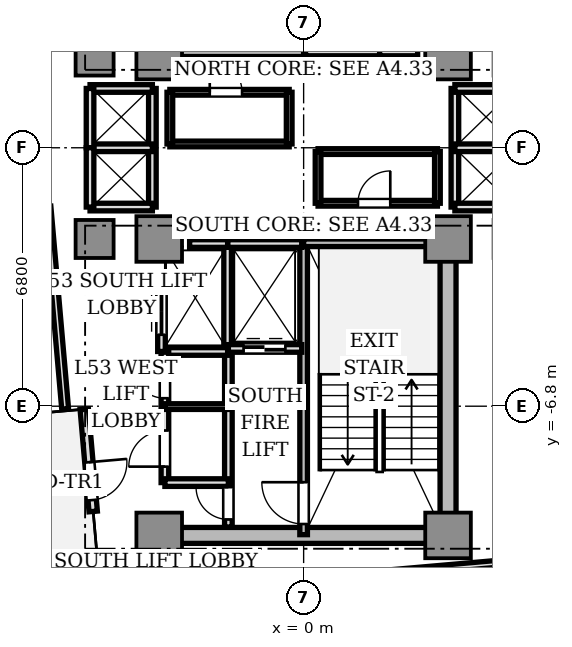
"""IFC4 building model, lengths in metres.
Left out: names, types, materials, properties, quantities, classifications, styles, units other than length and angle.
Written with IfcOpenShell. Run it as: python <this file> out.ifc"""

import sys

from ifc_helpers import new_model, si_unit, direction, frame, frame_2d, origin, origin_2d, place, context, subcontext, project, spatial, rectangle, extrude, source, transform, mapped, element, fill, save


model = new_model("IFC4")
c1 = context("Model", 3, precision=1e-05, world=origin(), true_north=direction((0.0, 1.0)))
c2 = subcontext(c1, "Body", "Model", "MODEL_VIEW")
j1 = project(units=[si_unit("LENGTHUNIT", "METRE"), si_unit("PLANEANGLEUNIT", "RADIAN")], contexts=[c1])
p1 = place(None, origin())
s1 = spatial("IfcSite", under=j1, at=p1, CompositionType="ELEMENT")
p2 = place(p1, origin())
s2 = spatial("IfcBuilding", under=s1, at=p2, CompositionType="ELEMENT")
p3 = place(p2, frame((0.0, 0.0, 191.95)))
s3 = spatial("IfcBuildingStorey", under=s2, at=p3, CompositionType="ELEMENT", Elevation=191.95)
p4 = place(p3, frame((-3.55, -10.2, 0.0), z_axis=(0.0, 0.0, 1.0), x_axis=(1.0, 0.0, 0.0)))
e1 = element("IfcWall", 1, at=p4, inside=s3, PredefinedType="SHEAR", context=c2, shape_type="SweptSolid", body=[
    extrude(rectangle(XDim=7.1, YDim=0.42, at=frame_2d((3.55, 0.0))), origin(), (0.0, 0.0, 1.0), 3.11),
])
p5 = place(p3, frame((3.8, -9.75, 0.0), z_axis=(0.0, 0.0, 1.0), x_axis=(0.0, 1.0, 0.0)))
e2 = element("IfcWall", 2, at=p5, inside=s3, PredefinedType="SHEAR", context=c2, shape_type="SweptSolid", body=[
    extrude(rectangle(XDim=6.9, YDim=0.42, at=frame_2d((3.45, 0.0))), origin(), (0.0, 0.0, 1.0), 3.11),
])
m1 = source(origin(), c2, "Body", "SweptSolid", [
    extrude(rectangle(XDim=1.2, YDim=1.2, at=origin_2d()), origin(), (0.0, 0.0, 1.0), 3.11),
])
for number, where, z_axis, x_axis in (
    (3, (-3.8, 2.4, 0.0), (0.0, 0.0, 1.0), (1.0, 0.0, 0.0)),
    (4, (3.8, 2.4, 0.0), (0.0, 0.0, 1.0), (1.0, 0.0, 0.0)),
    (5, (-3.8, -2.4, 0.0), (0.0, 0.0, 1.0), (1.0, 0.0, 0.0)),
    (6, (3.8, -2.4, 0.0), (0.0, 0.0, 1.0), (1.0, 0.0, 0.0)),
    (7, (-3.8, -10.2, 0.0), (0.0, 0.0, 1.0), (1.0, 0.0, 0.0)),
    (8, (3.8, -10.2, 0.0), (0.0, 0.0, 1.0), (1.0, 0.0, 0.0)),
):
    element("IfcColumn", number, at=place(p3, frame(where, z_axis=z_axis, x_axis=x_axis)), inside=s3, PredefinedType="COLUMN", context=c2, shape_type="MappedRepresentation", body=[
        mapped(m1, transform((0.0, 0.0, 0.0), scale=1.0)),
    ])
m2 = source(origin(), c2, "Body", "SweptSolid", [
    extrude(rectangle(XDim=1.0, YDim=1.0, at=origin_2d()), origin(), (0.0, 0.0, 1.0), 3.11),
])
for number, where, z_axis, x_axis in (
    (9, (-5.5, 2.4, 0.0), (0.0, 0.0, 1.0), (1.0, 0.0, 0.0)),
    (10, (-5.5, -2.4, 0.0), (0.0, 0.0, 1.0), (1.0, 0.0, 0.0)),
):
    element("IfcColumn", number, at=place(p3, frame(where, z_axis=z_axis, x_axis=x_axis)), inside=s3, PredefinedType="COLUMN", context=c2, shape_type="MappedRepresentation", body=[
        mapped(m2, transform((0.0, 0.0, 0.0), scale=1.0)),
    ])
p6 = place(p3, frame((-5.772, -6.879, 0.0), z_axis=(0.0, 0.0, 1.0), x_axis=(0.087168071984, -0.996193619346, 0.0)))
e11 = element("IfcWall", 11, at=p6, inside=s3, PredefinedType="STANDARD", context=c2, shape_type="SweptSolid", body=[
    extrude(rectangle(XDim=2.7, YDim=0.22, at=frame_2d((1.35, 0.0))), origin(), (0.0, 0.0, 1.0), 3.11),
])
p7 = place(p6, frame((1.4, 0.0, 0.0)))
e12 = element("IfcOpeningElement", 12, at=p7, cuts=e11, PredefinedType="OPENING", context=c2, shape_type="SweptSolid", body=[
    extrude(rectangle(XDim=1.0, YDim=2.2, at=frame_2d((0.5, 1.1))), frame((0.0, 0.12, 0.0), z_axis=(0.0, -1.0, 0.0), x_axis=(1.0, 0.0, 0.0)), (0.0, 0.0, 1.0), 0.24),
])
p8 = place(p3, frame((0.0, 2.5, 0.0), z_axis=(0.0, 0.0, 1.0), x_axis=(0.0, 1.0, 0.0)))
e13 = element("IfcWall", 13, at=p8, inside=s3, PredefinedType="SOLIDWALL", context=c2, shape_type="SweptSolid", body=[
    extrude(rectangle(XDim=7.68, YDim=0.2, at=frame_2d((3.84, 0.0))), origin(), (0.0, 0.0, 1.0), 3.11),
])
p9 = place(p8, frame((6.36, 0.0, 0.0)))
e14 = element("IfcOpeningElement", 14, at=p9, cuts=e13, PredefinedType="OPENING", context=c2, shape_type="SweptSolid", body=[
    extrude(rectangle(XDim=1.1, YDim=2.15, at=frame_2d((0.55, 1.075))), frame((0.0, 0.11, 0.0), z_axis=(0.0, -1.0, 0.0), x_axis=(1.0, 0.0, 0.0)), (0.0, 0.0, 1.0), 0.22),
])
p10 = place(p3, frame((-3.72, 2.5, 0.0), z_axis=(0.0, 0.0, 1.0), x_axis=(1.0, 0.0, 0.0)))
e15 = element("IfcWall", 15, at=p10, inside=s3, PredefinedType="SOLIDWALL", context=c2, shape_type="SweptSolid", body=[
    extrude(rectangle(XDim=3.72, YDim=0.2, at=frame_2d((1.86, 0.0))), origin(), (0.0, 0.0, 1.0), 3.11),
])
p11 = place(p3, frame((0.0, -10.18, 0.0), z_axis=(0.0, 0.0, 1.0), x_axis=(0.0, 1.0, 0.0)))
e16 = element("IfcWall", 16, at=p11, inside=s3, PredefinedType="SOLIDWALL", context=c2, shape_type="SweptSolid", body=[
    extrude(rectangle(XDim=7.68, YDim=0.2, at=frame_2d((3.84, 0.0))), origin(), (0.0, 0.0, 1.0), 3.11),
])
p12 = place(p11, frame((0.28, 0.0, 0.0)))
e17 = element("IfcOpeningElement", 17, at=p12, cuts=e16, PredefinedType="OPENING", context=c2, shape_type="SweptSolid", body=[
    extrude(rectangle(XDim=1.1, YDim=2.15, at=frame_2d((0.55, 1.075))), frame((0.0, 0.11, 0.0), z_axis=(0.0, -1.0, 0.0), x_axis=(1.0, 0.0, 0.0)), (0.0, 0.0, 1.0), 0.22),
])
p13 = place(p3, frame((0.0, -2.5, 0.0), z_axis=(0.0, 0.0, 1.0), x_axis=(1.0, 0.0, 0.0)))
e18 = element("IfcWall", 18, at=p13, inside=s3, PredefinedType="SOLIDWALL", context=c2, shape_type="SweptSolid", body=[
    extrude(rectangle(XDim=3.72, YDim=0.2, at=frame_2d((1.86, 0.0))), origin(), (0.0, 0.0, 1.0), 3.11),
])
p14 = place(p3, frame((-1.98, -9.98, 0.0), z_axis=(0.0, 0.0, 1.0), x_axis=(0.0, 1.0, 0.0)))
e19 = element("IfcWall", 19, at=p14, inside=s3, PredefinedType="SOLIDWALL", context=c2, shape_type="SweptSolid", body=[
    extrude(rectangle(XDim=4.66, YDim=0.2, at=frame_2d((2.33, 0.0))), origin(), (0.0, 0.0, 1.0), 2.66),
])
p15 = place(p14, frame((0.2, 0.0, 0.0)))
e20 = element("IfcOpeningElement", 20, at=p15, cuts=e19, PredefinedType="OPENING", context=c2, shape_type="SweptSolid", body=[
    extrude(rectangle(XDim=0.85, YDim=2.1, at=frame_2d((0.425, 1.05))), frame((0.0, 0.11, 0.0), z_axis=(0.0, -1.0, 0.0), x_axis=(1.0, 0.0, 0.0)), (0.0, 0.0, 1.0), 0.22),
])
p16 = place(p3, frame((2.0, 2.5, 0.0), z_axis=(0.0, 0.0, 1.0), x_axis=(0.0, 1.0, 0.0)))
e21 = element("IfcWall", 21, at=p16, inside=s3, PredefinedType="SOLIDWALL", context=c2, shape_type="SweptSolid", body=[
    extrude(rectangle(XDim=2.78, YDim=0.2, at=frame_2d((1.39, 0.0))), origin(), (0.0, 0.0, 1.0), 2.66),
])
p17 = place(p3, frame((0.05, 2.52, 0.0), z_axis=(0.0, 0.0, 1.0), x_axis=(1.0, 0.0, 0.0)))
e22 = element("IfcWall", 22, at=p17, inside=s3, PredefinedType="SOLIDWALL", context=c2, shape_type="SweptSolid", body=[
    extrude(rectangle(XDim=1.95, YDim=0.2, at=frame_2d((0.975, 0.0))), origin(), (0.0, 0.0, 1.0), 2.66),
])
p18 = place(p3, frame((-2.0, -5.28, 0.0), z_axis=(0.0, 0.0, 1.0), x_axis=(0.0, 1.0, 0.0)))
e23 = element("IfcWall", 23, at=p18, inside=s3, PredefinedType="SOLIDWALL", context=c2, shape_type="SweptSolid", body=[
    extrude(rectangle(XDim=2.78, YDim=0.2, at=frame_2d((1.39, 0.0))), origin(), (0.0, 0.0, 1.0), 2.66),
])
p19 = place(p3, frame((-2.0, -2.52, 0.0), z_axis=(0.0, 0.0, 1.0), x_axis=(1.0, 0.0, 0.0)))
e24 = element("IfcWall", 24, at=p19, inside=s3, PredefinedType="SOLIDWALL", context=c2, shape_type="SweptSolid", body=[
    extrude(rectangle(XDim=1.95, YDim=0.2, at=frame_2d((0.975, 0.0))), origin(), (0.0, 0.0, 1.0), 2.66),
])
p20 = place(p3, frame((-1.98, -5.28, 0.0), z_axis=(0.0, 0.0, 1.0), x_axis=(1.0, 0.0, 0.0)))
e25 = element("IfcWall", 25, at=p20, inside=s3, PredefinedType="SOLIDWALL", context=c2, shape_type="SweptSolid", body=[
    extrude(rectangle(XDim=1.93, YDim=0.2, at=frame_2d((0.965, 0.0))), origin(), (0.0, 0.0, 1.0), 2.66),
])
p21 = place(p20, frame((0.4, 0.0, 0.0)))
e26 = element("IfcOpeningElement", 26, at=p21, cuts=e25, PredefinedType="OPENING", context=c2, shape_type="SweptSolid", body=[
    extrude(rectangle(XDim=1.1, YDim=2.2, at=frame_2d((0.55, 1.1))), frame((0.0, 0.11, 0.0), z_axis=(0.0, -1.0, 0.0), x_axis=(1.0, 0.0, 0.0)), (0.0, 0.0, 1.0), 0.22),
])
for number, where, z_axis, x_axis in (
    (27, (2.0, 2.52, 0.0), (0.0, 0.0, 1.0), (1.0, 0.0, 0.0)),
    (28, (-3.0, -2.52, 0.0), (0.0, 0.0, 1.0), (1.0, 0.0, 0.0)),
):
    element("IfcWall", number, at=place(p3, frame(where, z_axis=z_axis, x_axis=x_axis)), inside=s3, PredefinedType="SOLIDWALL", context=c2, shape_type="SweptSolid", body=[
        extrude(rectangle(XDim=1.0, YDim=0.2, at=frame_2d((0.5, 0.0))), origin(), (0.0, 0.0, 1.0), 2.66),
    ])
p22 = place(p3, frame((-3.74, -5.36, 0.0), z_axis=(0.0, 0.0, 1.0), x_axis=(1.0, 0.0, 0.0)))
e29 = element("IfcWall", 29, at=p22, inside=s3, PredefinedType="SOLIDWALL", context=c2, shape_type="SweptSolid", body=[
    extrude(rectangle(XDim=1.74, YDim=0.2, at=frame_2d((0.87, 0.0))), origin(), (0.0, 0.0, 1.0), 2.66),
])
p23 = place(p3, frame((-3.74, -5.36, 0.0), z_axis=(0.0, 0.0, 1.0), x_axis=(0.0, 1.0, 0.0)))
e30 = element("IfcWall", 30, at=p23, inside=s3, PredefinedType="SOLIDWALL", context=c2, shape_type="SweptSolid", body=[
    extrude(rectangle(XDim=2.08, YDim=0.2, at=frame_2d((1.04, 0.0))), origin(), (0.0, 0.0, 1.0), 2.66),
])
p24 = place(p23, frame((0.44, 0.0, 0.0)))
e31 = element("IfcOpeningElement", 31, at=p24, cuts=e30, PredefinedType="OPENING", context=c2, shape_type="SweptSolid", body=[
    extrude(rectangle(XDim=1.2, YDim=2.2, at=frame_2d((0.6, 1.1))), frame((0.0, 0.11, 0.0), z_axis=(0.0, -1.0, 0.0), x_axis=(1.0, 0.0, 0.0)), (0.0, 0.0, 1.0), 0.22),
])
p25 = place(p3, frame((3.98, -1.56, 0.0), z_axis=(0.0, 0.0, 1.0), x_axis=(0.0, 1.0, 0.0)))
e32 = element("IfcWall", 32, at=p25, inside=s3, PredefinedType="SOLIDWALL", context=c2, shape_type="SweptSolid", body=[
    extrude(rectangle(XDim=3.12, YDim=0.2, at=frame_2d((1.56, 0.0))), origin(), (0.0, 0.0, 1.0), 2.28),
])
for number, where, z_axis, x_axis in (
    (33, (3.98, 1.56, 0.0), (0.0, 0.0, 1.0), (1.0, 0.0, 0.0)),
    (34, (3.98, -1.56, 0.0), (0.0, 0.0, 1.0), (1.0, 0.0, 0.0)),
    (35, (3.98, 0.0, 0.0), (0.0, 0.0, 1.0), (1.0, 0.0, 0.0)),
):
    element("IfcWall", number, at=place(p3, frame(where, z_axis=z_axis, x_axis=x_axis)), inside=s3, PredefinedType="SOLIDWALL", context=c2, shape_type="SweptSolid", body=[
        extrude(rectangle(XDim=1.64, YDim=0.2, at=frame_2d((0.82, 0.0))), origin(), (0.0, 0.0, 1.0), 2.66),
    ])
p26 = place(p3, frame((-3.98, -1.56, 0.0), z_axis=(0.0, 0.0, 1.0), x_axis=(0.0, 1.0, 0.0)))
e36 = element("IfcWall", 36, at=p26, inside=s3, PredefinedType="SOLIDWALL", context=c2, shape_type="SweptSolid", body=[
    extrude(rectangle(XDim=3.12, YDim=0.2, at=frame_2d((1.56, 0.0))), origin(), (0.0, 0.0, 1.0), 2.28),
])
for number, where, z_axis, x_axis in (
    (37, (-5.62, 1.56, 0.0), (0.0, 0.0, 1.0), (1.0, 0.0, 0.0)),
    (38, (-5.62, -1.56, 0.0), (0.0, 0.0, 1.0), (1.0, 0.0, 0.0)),
    (39, (-5.62, 0.0, 0.0), (0.0, 0.0, 1.0), (1.0, 0.0, 0.0)),
):
    element("IfcWall", number, at=place(p3, frame(where, z_axis=z_axis, x_axis=x_axis)), inside=s3, PredefinedType="SOLIDWALL", context=c2, shape_type="SweptSolid", body=[
        extrude(rectangle(XDim=1.64, YDim=0.2, at=frame_2d((0.82, 0.0))), origin(), (0.0, 0.0, 1.0), 2.66),
    ])
for number, where, z_axis, x_axis in (
    (40, (-5.62, 0.0, 0.0), (0.0, 0.0, 1.0), (0.0, 1.0, 0.0)),
    (41, (-5.62, -1.56, 0.0), (0.0, 0.0, 1.0), (0.0, 1.0, 0.0)),
):
    element("IfcWall", number, at=place(p3, frame(where, z_axis=z_axis, x_axis=x_axis)), inside=s3, PredefinedType="SOLIDWALL", context=c2, shape_type="SweptSolid", body=[
        extrude(rectangle(XDim=1.56, YDim=0.2, at=frame_2d((0.78, 0.0))), origin(), (0.0, 0.0, 1.0), 2.66),
    ])
p27 = place(p3, frame((-3.65, -8.81, 0.0), z_axis=(0.0, 0.0, 1.0), x_axis=(0.0, 1.0, 0.0)))
e42 = element("IfcWall", 42, at=p27, inside=s3, PredefinedType="SOLIDWALL", context=c2, shape_type="SweptSolid", body=[
    extrude(rectangle(XDim=3.43, YDim=0.2, at=frame_2d((1.715, 0.0))), origin(), (0.0, 0.0, 1.0), 2.66),
])
p28 = place(p27, frame((0.42, 0.0, 0.0)))
e43 = element("IfcOpeningElement", 43, at=p28, cuts=e42, PredefinedType="OPENING", context=c2, shape_type="SweptSolid", body=[
    extrude(rectangle(XDim=0.95, YDim=2.15, at=frame_2d((0.475, 1.075))), frame((0.0, 0.11, 0.0), z_axis=(0.0, -1.0, 0.0), x_axis=(1.0, 0.0, 0.0)), (0.0, 0.0, 1.0), 0.22),
])
p29 = place(p27, frame((2.22, 0.0, 0.0)))
e44 = element("IfcOpeningElement", 44, at=p29, cuts=e42, PredefinedType="OPENING", context=c2, shape_type="SweptSolid", body=[
    extrude(rectangle(XDim=0.85, YDim=2.1, at=frame_2d((0.425, 1.05))), frame((0.0, 0.11, 0.0), z_axis=(0.0, -1.0, 0.0), x_axis=(1.0, 0.0, 0.0)), (0.0, 0.0, 1.0), 0.22),
])
p30 = place(p3, frame((-3.65, -8.81, 0.0), z_axis=(0.0, 0.0, 1.0), x_axis=(1.0, 0.0, 0.0)))
e45 = element("IfcWall", 45, at=p30, inside=s3, PredefinedType="SOLIDWALL", context=c2, shape_type="SweptSolid", body=[
    extrude(rectangle(XDim=1.67, YDim=0.2, at=frame_2d((0.835, 0.0))), origin(), (0.0, 0.0, 1.0), 2.66),
])
p31 = place(p3, frame((-3.65, -6.81, 0.0), z_axis=(0.0, 0.0, 1.0), x_axis=(1.0, 0.0, 0.0)))
e46 = element("IfcWall", 46, at=p31, inside=s3, PredefinedType="PARTITIONING", context=c2, shape_type="SweptSolid", body=[
    extrude(rectangle(XDim=1.67, YDim=0.15, at=frame_2d((0.835, 0.0))), origin(), (0.0, 0.0, 1.0), 2.66),
])
p32 = place(p3, frame((-3.52, 0.1, 0.0), z_axis=(0.0, 0.0, 1.0), x_axis=(1.0, 0.0, 0.0)))
e47 = element("IfcWall", 47, at=p32, inside=s3, PredefinedType="PARTITIONING", context=c2, shape_type="SweptSolid", body=[
    extrude(rectangle(XDim=3.14, YDim=0.15, at=frame_2d((1.57, 0.0))), origin(), (0.0, 0.0, 1.0), 2.66),
])
p33 = place(p3, frame((-3.52, 1.46, 0.0), z_axis=(0.0, 0.0, 1.0), x_axis=(1.0, 0.0, 0.0)))
e48 = element("IfcWall", 48, at=p33, inside=s3, PredefinedType="PARTITIONING", context=c2, shape_type="SweptSolid", body=[
    extrude(rectangle(XDim=3.14, YDim=0.15, at=frame_2d((1.57, 0.0))), origin(), (0.0, 0.0, 1.0), 2.66),
])
p34 = place(p33, frame((1.05, 0.0, 0.0)))
e49 = element("IfcOpeningElement", 49, at=p34, cuts=e48, PredefinedType="OPENING", context=c2, shape_type="SweptSolid", body=[
    extrude(rectangle(XDim=0.85, YDim=2.1, at=frame_2d((0.425, 1.05))), frame((0.0, 0.085, 0.0), z_axis=(0.0, -1.0, 0.0), x_axis=(1.0, 0.0, 0.0)), (0.0, 0.0, 1.0), 0.17),
])
p35 = place(p3, frame((-3.52, 0.1, 0.0), z_axis=(0.0, 0.0, 1.0), x_axis=(0.0, 1.0, 0.0)))
e50 = element("IfcWall", 50, at=p35, inside=s3, PredefinedType="PARTITIONING", context=c2, shape_type="SweptSolid", body=[
    extrude(rectangle(XDim=1.36, YDim=0.15, at=frame_2d((0.68, 0.0))), origin(), (0.0, 0.0, 1.0), 2.28),
])
p36 = place(p3, frame((-0.38, 0.1, 0.0), z_axis=(0.0, 0.0, 1.0), x_axis=(0.0, 1.0, 0.0)))
e51 = element("IfcWall", 51, at=p36, inside=s3, PredefinedType="PARTITIONING", context=c2, shape_type="SweptSolid", body=[
    extrude(rectangle(XDim=1.36, YDim=0.15, at=frame_2d((0.68, 0.0))), origin(), (0.0, 0.0, 1.0), 2.66),
])
p37 = place(p3, frame((0.38, -0.1, 0.0), z_axis=(0.0, 0.0, 1.0), x_axis=(1.0, 0.0, 0.0)))
e52 = element("IfcWall", 52, at=p37, inside=s3, PredefinedType="PARTITIONING", context=c2, shape_type="SweptSolid", body=[
    extrude(rectangle(XDim=3.14, YDim=0.15, at=frame_2d((1.57, 0.0))), origin(), (0.0, 0.0, 1.0), 2.66),
])
p38 = place(p3, frame((0.38, -1.46, 0.0), z_axis=(0.0, 0.0, 1.0), x_axis=(1.0, 0.0, 0.0)))
e53 = element("IfcWall", 53, at=p38, inside=s3, PredefinedType="PARTITIONING", context=c2, shape_type="SweptSolid", body=[
    extrude(rectangle(XDim=3.14, YDim=0.15, at=frame_2d((1.57, 0.0))), origin(), (0.0, 0.0, 1.0), 2.66),
])
p39 = place(p38, frame((1.05, 0.0, 0.0)))
e54 = element("IfcOpeningElement", 54, at=p39, cuts=e53, PredefinedType="OPENING", context=c2, shape_type="SweptSolid", body=[
    extrude(rectangle(XDim=0.85, YDim=2.1, at=frame_2d((0.425, 1.05))), frame((0.0, 0.085, 0.0), z_axis=(0.0, -1.0, 0.0), x_axis=(1.0, 0.0, 0.0)), (0.0, 0.0, 1.0), 0.17),
])
p40 = place(p3, frame((0.38, -1.46, 0.0), z_axis=(0.0, 0.0, 1.0), x_axis=(0.0, 1.0, 0.0)))
e55 = element("IfcWall", 55, at=p40, inside=s3, PredefinedType="PARTITIONING", context=c2, shape_type="SweptSolid", body=[
    extrude(rectangle(XDim=1.36, YDim=0.15, at=frame_2d((0.68, 0.0))), origin(), (0.0, 0.0, 1.0), 2.66),
])
p41 = place(p3, frame((3.52, -1.46, 0.0), z_axis=(0.0, 0.0, 1.0), x_axis=(0.0, 1.0, 0.0)))
e56 = element("IfcWall", 56, at=p41, inside=s3, PredefinedType="PARTITIONING", context=c2, shape_type="SweptSolid", body=[
    extrude(rectangle(XDim=1.36, YDim=0.15, at=frame_2d((0.68, 0.0))), origin(), (0.0, 0.0, 1.0), 2.28),
])
p42 = place(p3, frame((-6.741, -1.543, 0.0), z_axis=(0.0, 0.0, 1.0), x_axis=(0.087161289348, -0.996194212812, 0.0)))
e57 = element("IfcWall", 57, at=p42, inside=s3, PredefinedType="PARTITIONING", context=c2, shape_type="SweptSolid", body=[
    extrude(rectangle(XDim=5.35, YDim=0.18, at=frame_2d((2.675, 0.0))), origin(), (0.0, 0.0, 1.0), 2.66),
])
p43 = place(p3, frame((-5.287, -11.856, 0.0), z_axis=(0.0, 0.0, 1.0), x_axis=(0.996194023261, 0.087163455754, 0.0)))
e58 = element("IfcWall", 58, at=p43, inside=s3, PredefinedType="PARTITIONING", context=c2, shape_type="SweptSolid", body=[
    extrude(rectangle(XDim=10.4, YDim=0.18, at=frame_2d((5.2, 0.0))), origin(), (0.0, 0.0, 1.0), 2.66),
])
m3 = source(origin(), c2, "Body", "SweptSolid", [
    extrude(rectangle(XDim=1.0, YDim=0.05, at=origin_2d()), origin(), (0.0, 0.0, 1.0), 2.2),
])
p44 = place(p7, frame((0.5, 0.0, 0.0)))
e59 = element("IfcDoor", 59, at=p44, inside=s3, OperationType="SINGLE_SWING_LEFT", PredefinedType="DOOR", context=c2, shape_type="MappedRepresentation", body=[
    mapped(m3, transform((0.0, 0.0, 0.0), scale=1.0)),
])
fill(e12, e59)
m4 = source(origin(), c2, "Body", "SweptSolid", [
    extrude(rectangle(XDim=1.1, YDim=0.05, at=origin_2d()), origin(), (0.0, 0.0, 1.0), 2.15),
])
p45 = place(p12, frame((0.55, 0.0, 0.0)))
e60 = element("IfcDoor", 60, at=p45, inside=s3, OperationType="SINGLE_SWING_RIGHT", PredefinedType="DOOR", context=c2, shape_type="MappedRepresentation", body=[
    mapped(m4, transform((0.0, 0.0, 0.0), scale=1.0)),
])
fill(e17, e60)
m5 = source(origin(), c2, "Body", "SweptSolid", [
    extrude(rectangle(XDim=0.85, YDim=0.05, at=origin_2d()), origin(), (0.0, 0.0, 1.0), 2.1),
])
p46 = place(p15, frame((0.425, 0.0, 0.0)))
e61 = element("IfcDoor", 61, at=p46, inside=s3, OperationType="SINGLE_SWING_RIGHT", PredefinedType="DOOR", context=c2, shape_type="MappedRepresentation", body=[
    mapped(m5, transform((0.0, 0.0, 0.0), scale=1.0)),
])
fill(e20, e61)
m6 = source(origin(), c2, "Body", "SweptSolid", [
    extrude(rectangle(XDim=1.1, YDim=0.05, at=origin_2d()), origin(), (0.0, 0.0, 1.0), 2.2),
])
p47 = place(p21, frame((0.55, 0.0, 0.0)))
e62 = element("IfcDoor", 62, at=p47, inside=s3, OperationType="DOUBLE_DOOR_SLIDING", PredefinedType="DOOR", context=c2, shape_type="MappedRepresentation", body=[
    mapped(m6, transform((0.0, 0.0, 0.0), scale=1.0)),
])
fill(e26, e62)
m7 = source(origin(), c2, "Body", "SweptSolid", [
    extrude(rectangle(XDim=1.2, YDim=0.05, at=origin_2d()), origin(), (0.0, 0.0, 1.0), 2.2),
])
p48 = place(p24, frame((0.6, 0.0, 0.0)))
e63 = element("IfcDoor", 63, at=p48, inside=s3, OperationType="DOUBLE_DOOR_SLIDING", PredefinedType="DOOR", context=c2, shape_type="MappedRepresentation", body=[
    mapped(m7, transform((0.0, 0.0, 0.0), scale=1.0)),
])
fill(e31, e63)
m8 = source(origin(), c2, "Body", "SweptSolid", [
    extrude(rectangle(XDim=0.95, YDim=0.05, at=origin_2d()), origin(), (0.0, 0.0, 1.0), 2.15),
])
p49 = place(p28, frame((0.475, 0.0, 0.0)))
e64 = element("IfcDoor", 64, at=p49, inside=s3, OperationType="SINGLE_SWING_LEFT", PredefinedType="DOOR", context=c2, shape_type="MappedRepresentation", body=[
    mapped(m8, transform((0.0, 0.0, 0.0), scale=1.0)),
])
fill(e43, e64)
p50 = place(p29, frame((0.425, 0.0, 0.0)))
e65 = element("IfcDoor", 65, at=p50, inside=s3, OperationType="SINGLE_SWING_RIGHT", PredefinedType="DOOR", context=c2, shape_type="MappedRepresentation", body=[
    mapped(m5, transform((0.0, 0.0, 0.0), scale=1.0)),
])
fill(e44, e65)
p51 = place(p34, frame((0.425, 0.0, 0.0)))
e66 = element("IfcDoor", 66, at=p51, inside=s3, OperationType="SINGLE_SWING_LEFT", PredefinedType="DOOR", context=c2, shape_type="MappedRepresentation", body=[
    mapped(m5, transform((0.0, 0.0, 0.0), scale=1.0)),
])
fill(e49, e66)
p52 = place(p39, frame((0.425, 0.0, 0.0)))
e67 = element("IfcDoor", 67, at=p52, inside=s3, OperationType="SINGLE_SWING_RIGHT", PredefinedType="DOOR", context=c2, shape_type="MappedRepresentation", body=[
    mapped(m5, transform((0.0, 0.0, 0.0), scale=1.0)),
])
fill(e54, e67)
save(model, sys.argv[1])
